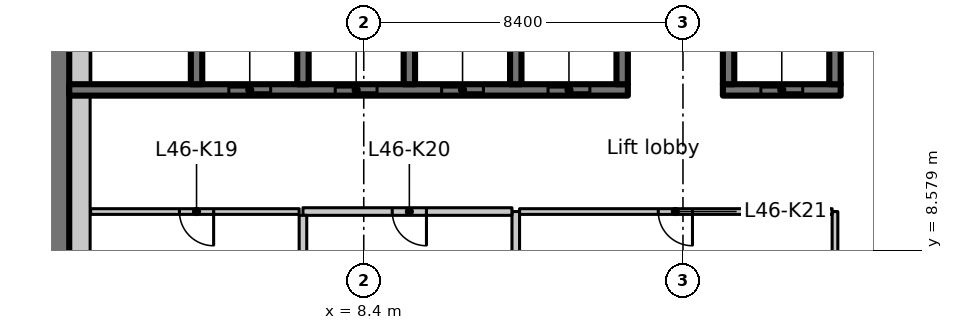
"""IFC4 building model, lengths in metres.
Left out: names, types, materials, properties, quantities, classifications, styles, units other than length and angle.
Written with IfcOpenShell. Run it as: python <this file> out.ifc"""

import sys

from ifc_helpers import new_model, si_unit, direction, frame, frame_2d, origin, place, context, subcontext, project, spatial, rectangle, extrude, element, fill, save


model = new_model("IFC4")
c1 = context("Model", 3, precision=1e-05, world=origin(), true_north=direction((0.0, 1.0)))
c2 = subcontext(c1, "Body", "Model", "MODEL_VIEW")
j1 = project(units=[si_unit("LENGTHUNIT", "METRE"), si_unit("PLANEANGLEUNIT", "RADIAN")], contexts=[c1])
p1 = place(None, origin())
s1 = spatial("IfcSite", under=j1, at=p1, CompositionType="ELEMENT")
p2 = place(p1, origin())
s2 = spatial("IfcBuilding", under=s1, at=p2, CompositionType="ELEMENT")
p3 = place(p2, frame((0.0, 0.0, 184.8)))
s3 = spatial("IfcBuildingStorey", under=s2, at=p3, CompositionType="ELEMENT", Elevation=184.8)
p4 = place(p3, frame((0.325, 7.286, 0.0), z_axis=(0.0, 0.0, 1.0), x_axis=(0.0, 1.0, 0.0)))
e1 = element("IfcWall", 1, at=p4, inside=s3, PredefinedType="SHEAR", context=c2, shape_type="SweptSolid", body=[
    extrude(rectangle(XDim=8.864, YDim=0.65, at=frame_2d((4.432, 0.0))), origin(), (0.0, 0.0, 1.0), 3.35),
])
p5 = place(p3, frame((0.65, 12.8, 0.0), z_axis=(0.0, 0.0, 1.0), x_axis=(1.0, 0.0, 0.0)))
e2 = element("IfcWall", 2, at=p5, inside=s3, PredefinedType="SHEAR", context=c2, shape_type="SweptSolid", body=[
    extrude(rectangle(XDim=14.7, YDim=0.3, at=frame_2d((7.35, 0.0))), origin(), (0.0, 0.0, 1.0), 3.35),
])
p6 = place(p5, frame((4.2, 0.0, 0.0)))
e3 = element("IfcOpeningElement", 3, at=p6, cuts=e2, PredefinedType="OPENING", context=c2, shape_type="SweptSolid", body=[
    extrude(rectangle(XDim=1.1, YDim=2.3, at=frame_2d((0.55, 1.15))), frame((0.0, 0.16, 0.0), z_axis=(0.0, -1.0, 0.0), x_axis=(1.0, 0.0, 0.0)), (0.0, 0.0, 1.0), 0.32),
])
p7 = place(p5, frame((7.0, 0.0, 0.0)))
e4 = element("IfcOpeningElement", 4, at=p7, cuts=e2, PredefinedType="OPENING", context=c2, shape_type="SweptSolid", body=[
    extrude(rectangle(XDim=1.1, YDim=2.3, at=frame_2d((0.55, 1.15))), frame((0.0, 0.16, 0.0), z_axis=(0.0, -1.0, 0.0), x_axis=(1.0, 0.0, 0.0)), (0.0, 0.0, 1.0), 0.32),
])
p8 = place(p5, frame((9.8, 0.0, 0.0)))
e5 = element("IfcOpeningElement", 5, at=p8, cuts=e2, PredefinedType="OPENING", context=c2, shape_type="SweptSolid", body=[
    extrude(rectangle(XDim=1.1, YDim=2.3, at=frame_2d((0.55, 1.15))), frame((0.0, 0.16, 0.0), z_axis=(0.0, -1.0, 0.0), x_axis=(1.0, 0.0, 0.0)), (0.0, 0.0, 1.0), 0.32),
])
p9 = place(p5, frame((12.6, 0.0, 0.0)))
e6 = element("IfcOpeningElement", 6, at=p9, cuts=e2, PredefinedType="OPENING", context=c2, shape_type="SweptSolid", body=[
    extrude(rectangle(XDim=1.1, YDim=2.3, at=frame_2d((0.55, 1.15))), frame((0.0, 0.16, 0.0), z_axis=(0.0, -1.0, 0.0), x_axis=(1.0, 0.0, 0.0)), (0.0, 0.0, 1.0), 0.32),
])
for number, where, z_axis, x_axis in (
    (7, (4.0, 12.95, 0.0), (0.0, 0.0, 1.0), (0.0, 1.0, 0.0)),
    (8, (6.8, 12.95, 0.0), (0.0, 0.0, 1.0), (0.0, 1.0, 0.0)),
    (9, (9.6, 12.95, 0.0), (0.0, 0.0, 1.0), (0.0, 1.0, 0.0)),
    (10, (12.4, 12.95, 0.0), (0.0, 0.0, 1.0), (0.0, 1.0, 0.0)),
    (11, (15.2, 12.95, 0.0), (0.0, 0.0, 1.0), (0.0, 1.0, 0.0)),
):
    element("IfcWall", number, at=place(p3, frame(where, z_axis=z_axis, x_axis=x_axis)), inside=s3, PredefinedType="SHEAR", context=c2, shape_type="SweptSolid", body=[
        extrude(rectangle(XDim=3.2, YDim=0.3, at=frame_2d((1.6, 0.0))), origin(), (0.0, 0.0, 1.0), 3.35),
    ])
p10 = place(p3, frame((17.85, 12.8, 0.0), z_axis=(0.0, 0.0, 1.0), x_axis=(1.0, 0.0, 0.0)))
e12 = element("IfcWall", 12, at=p10, inside=s3, PredefinedType="SHEAR", context=c2, shape_type="SweptSolid", body=[
    extrude(rectangle(XDim=3.1, YDim=0.3, at=frame_2d((1.55, 0.0))), origin(), (0.0, 0.0, 1.0), 3.35),
])
p11 = place(p10, frame((1.0, 0.0, 0.0)))
e13 = element("IfcOpeningElement", 13, at=p11, cuts=e12, PredefinedType="OPENING", context=c2, shape_type="SweptSolid", body=[
    extrude(rectangle(XDim=1.1, YDim=2.3, at=frame_2d((0.55, 1.15))), frame((0.0, 0.16, 0.0), z_axis=(0.0, -1.0, 0.0), x_axis=(1.0, 0.0, 0.0)), (0.0, 0.0, 1.0), 0.32),
])
for number, where, z_axis, x_axis in (
    (14, (18.0, 12.95, 0.0), (0.0, 0.0, 1.0), (0.0, 1.0, 0.0)),
    (15, (20.8, 12.95, 0.0), (0.0, 0.0, 1.0), (0.0, 1.0, 0.0)),
):
    element("IfcWall", number, at=place(p3, frame(where, z_axis=z_axis, x_axis=x_axis)), inside=s3, PredefinedType="SHEAR", context=c2, shape_type="SweptSolid", body=[
        extrude(rectangle(XDim=3.2, YDim=0.3, at=frame_2d((1.6, 0.0))), origin(), (0.0, 0.0, 1.0), 3.35),
    ])
p12 = place(p3, frame((12.4, 7.1, 0.0), z_axis=(0.0, 0.0, 1.0), x_axis=(0.0, 1.0, 0.0)))
e16 = element("IfcWall", 16, at=p12, inside=s3, PredefinedType="PARTITIONING", context=c2, shape_type="SweptSolid", body=[
    extrude(rectangle(XDim=2.5, YDim=0.2, at=frame_2d((1.25, 0.0))), origin(), (0.0, 0.0, 1.0), 3.35),
])
p13 = place(p3, frame((12.3, 9.6, 0.0), z_axis=(0.0, 0.0, 1.0), x_axis=(-1.0, 0.0, 0.0)))
e17 = element("IfcWall", 17, at=p13, inside=s3, PredefinedType="PARTITIONING", context=c2, shape_type="SweptSolid", body=[
    extrude(rectangle(XDim=5.5, YDim=0.2, at=frame_2d((2.75, 0.0))), origin(), (0.0, 0.0, 1.0), 3.35),
])
p14 = place(p13, frame((2.25, 0.0, 0.0)))
e18 = element("IfcOpeningElement", 18, at=p14, cuts=e17, PredefinedType="OPENING", context=c2, shape_type="SweptSolid", body=[
    extrude(rectangle(XDim=0.9, YDim=2.1, at=frame_2d((0.45, 1.05))), frame((0.0, 0.11, 0.0), z_axis=(0.0, -1.0, 0.0), x_axis=(1.0, 0.0, 0.0)), (0.0, 0.0, 1.0), 0.22),
])
p15 = place(p3, frame((6.8, 9.5, 0.0), z_axis=(0.0, 0.0, 1.0), x_axis=(0.0, -1.0, 0.0)))
e19 = element("IfcWall", 19, at=p15, inside=s3, PredefinedType="PARTITIONING", context=c2, shape_type="SweptSolid", body=[
    extrude(rectangle(XDim=2.4, YDim=0.2, at=frame_2d((1.2, 0.0))), origin(), (0.0, 0.0, 1.0), 3.35),
])
p16 = place(p3, frame((6.7, 9.6, 0.0), z_axis=(0.0, 0.0, 1.0), x_axis=(-1.0, 0.0, 0.0)))
e20 = element("IfcWall", 20, at=p16, inside=s3, PredefinedType="PARTITIONING", context=c2, shape_type="SweptSolid", body=[
    extrude(rectangle(XDim=5.488, YDim=0.15, at=frame_2d((2.744, 0.0))), origin(), (0.0, 0.0, 1.0), 3.35),
])
p17 = place(p16, frame((2.25, 0.0, 0.0)))
e21 = element("IfcOpeningElement", 21, at=p17, cuts=e20, PredefinedType="OPENING", context=c2, shape_type="SweptSolid", body=[
    extrude(rectangle(XDim=0.9, YDim=2.1, at=frame_2d((0.45, 1.05))), frame((0.0, 0.085, 0.0), z_axis=(0.0, -1.0, 0.0), x_axis=(1.0, 0.0, 0.0)), (0.0, 0.0, 1.0), 0.17),
])
p18 = place(p3, frame((20.8, 7.075, 0.0), z_axis=(0.0, 0.0, 1.0), x_axis=(0.0, 1.0, 0.0)))
e22 = element("IfcWall", 22, at=p18, inside=s3, PredefinedType="PARTITIONING", context=c2, shape_type="SweptSolid", body=[
    extrude(rectangle(XDim=2.525, YDim=0.15, at=frame_2d((1.263, 0.0))), origin(), (0.0, 0.0, 1.0), 3.35),
])
p19 = place(p3, frame((20.725, 9.6, 0.0), z_axis=(0.0, 0.0, 1.0), x_axis=(-1.0, 0.0, 0.0)))
e23 = element("IfcWall", 23, at=p19, inside=s3, PredefinedType="PARTITIONING", context=c2, shape_type="SweptSolid", body=[
    extrude(rectangle(XDim=8.225, YDim=0.15, at=frame_2d((4.113, 0.0))), origin(), (0.0, 0.0, 1.0), 3.35),
])
p20 = place(p19, frame((3.675, 0.0, 0.0)))
e24 = element("IfcOpeningElement", 24, at=p20, cuts=e23, PredefinedType="OPENING", context=c2, shape_type="SweptSolid", body=[
    extrude(rectangle(XDim=0.9, YDim=2.1, at=frame_2d((0.45, 1.05))), frame((0.0, 0.085, 0.0), z_axis=(0.0, -1.0, 0.0), x_axis=(1.0, 0.0, 0.0)), (0.0, 0.0, 1.0), 0.17),
])
p21 = place(p3, frame((0.925, 7.286, 0.0), z_axis=(0.0, 0.0, 1.0), x_axis=(0.0, 1.0, 0.0)))
e25 = element("IfcWall", 25, at=p21, inside=s3, PredefinedType="PARTITIONING", context=c2, shape_type="SweptSolid", body=[
    extrude(rectangle(XDim=5.364, YDim=0.55, at=frame_2d((2.682, 0.0))), origin(), (0.0, 0.0, 1.0), 3.35),
])
p22 = place(p3, frame((0.925, 12.95, 0.0), z_axis=(0.0, 0.0, 1.0), x_axis=(0.0, 1.0, 0.0)))
e26 = element("IfcWall", 26, at=p22, inside=s3, PredefinedType="PARTITIONING", context=c2, shape_type="SweptSolid", body=[
    extrude(rectangle(XDim=2.65, YDim=0.55, at=frame_2d((1.325, 0.0))), origin(), (0.0, 0.0, 1.0), 3.35),
])
p23 = place(p6, origin())
e27 = element("IfcDoor", 27, at=p23, inside=s3, OperationType="SLIDING_TO_LEFT", PredefinedType="DOOR", context=c2, shape_type="SweptSolid", body=[
    extrude(rectangle(XDim=1.1, YDim=2.3, at=frame_2d((0.55, 1.15))), frame((0.0, 0.025, 0.0), z_axis=(0.0, -1.0, 0.0), x_axis=(1.0, 0.0, 0.0)), (0.0, 0.0, 1.0), 0.05),
])
fill(e3, e27)
p24 = place(p7, origin())
e28 = element("IfcDoor", 28, at=p24, inside=s3, OperationType="SLIDING_TO_LEFT", PredefinedType="DOOR", context=c2, shape_type="SweptSolid", body=[
    extrude(rectangle(XDim=1.1, YDim=2.3, at=frame_2d((0.55, 1.15))), frame((0.0, 0.025, 0.0), z_axis=(0.0, -1.0, 0.0), x_axis=(1.0, 0.0, 0.0)), (0.0, 0.0, 1.0), 0.05),
])
fill(e4, e28)
p25 = place(p8, origin())
e29 = element("IfcDoor", 29, at=p25, inside=s3, OperationType="SLIDING_TO_LEFT", PredefinedType="DOOR", context=c2, shape_type="SweptSolid", body=[
    extrude(rectangle(XDim=1.1, YDim=2.3, at=frame_2d((0.55, 1.15))), frame((0.0, 0.025, 0.0), z_axis=(0.0, -1.0, 0.0), x_axis=(1.0, 0.0, 0.0)), (0.0, 0.0, 1.0), 0.05),
])
fill(e5, e29)
p26 = place(p9, origin())
e30 = element("IfcDoor", 30, at=p26, inside=s3, OperationType="SLIDING_TO_LEFT", PredefinedType="DOOR", context=c2, shape_type="SweptSolid", body=[
    extrude(rectangle(XDim=1.1, YDim=2.3, at=frame_2d((0.55, 1.15))), frame((0.0, 0.025, 0.0), z_axis=(0.0, -1.0, 0.0), x_axis=(1.0, 0.0, 0.0)), (0.0, 0.0, 1.0), 0.05),
])
fill(e6, e30)
p27 = place(p11, origin())
e31 = element("IfcDoor", 31, at=p27, inside=s3, OperationType="SLIDING_TO_LEFT", PredefinedType="DOOR", context=c2, shape_type="SweptSolid", body=[
    extrude(rectangle(XDim=1.1, YDim=2.3, at=frame_2d((0.55, 1.15))), frame((0.0, 0.025, 0.0), z_axis=(0.0, -1.0, 0.0), x_axis=(1.0, 0.0, 0.0)), (0.0, 0.0, 1.0), 0.05),
])
fill(e13, e31)
p28 = place(p17, origin())
e32 = element("IfcDoor", 32, at=p28, inside=s3, OperationType="SINGLE_SWING_RIGHT", PredefinedType="DOOR", context=c2, shape_type="SweptSolid", body=[
    extrude(rectangle(XDim=0.9, YDim=2.1, at=frame_2d((0.45, 1.05))), frame((0.0, 0.025, 0.0), z_axis=(0.0, -1.0, 0.0), x_axis=(1.0, 0.0, 0.0)), (0.0, 0.0, 1.0), 0.05),
])
fill(e21, e32)
p29 = place(p14, origin())
e33 = element("IfcDoor", 33, at=p29, inside=s3, OperationType="SINGLE_SWING_LEFT", PredefinedType="DOOR", context=c2, shape_type="SweptSolid", body=[
    extrude(rectangle(XDim=0.9, YDim=2.1, at=frame_2d((0.45, 1.05))), frame((0.0, 0.025, 0.0), z_axis=(0.0, -1.0, 0.0), x_axis=(1.0, 0.0, 0.0)), (0.0, 0.0, 1.0), 0.05),
])
fill(e18, e33)
p30 = place(p20, origin())
e34 = element("IfcDoor", 34, at=p30, inside=s3, OperationType="SINGLE_SWING_RIGHT", PredefinedType="DOOR", context=c2, shape_type="SweptSolid", body=[
    extrude(rectangle(XDim=0.9, YDim=2.1, at=frame_2d((0.45, 1.05))), frame((0.0, 0.025, 0.0), z_axis=(0.0, -1.0, 0.0), x_axis=(1.0, 0.0, 0.0)), (0.0, 0.0, 1.0), 0.05),
])
fill(e24, e34)
save(model, sys.argv[1])
